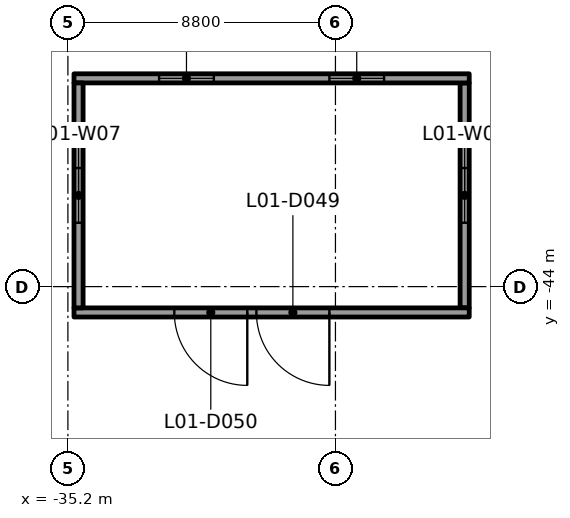
"""IFC4 building model, lengths in metres.
Left out: names, types, materials, properties, quantities, classifications, styles, units other than length and angle.
Written with IfcOpenShell. Run it as: python <this file> out.ifc"""

import sys

from ifc_helpers import new_model, si_unit, direction, frame, frame_2d, origin, place, context, subcontext, project, spatial, rectangle, extrude, element, fill, save


model = new_model("IFC4")
c1 = context("Model", 3, precision=1e-05, world=origin(), true_north=direction((0.0, 1.0)))
c2 = subcontext(c1, "Body", "Model", "MODEL_VIEW")
j1 = project(units=[si_unit("LENGTHUNIT", "METRE"), si_unit("PLANEANGLEUNIT", "RADIAN")], contexts=[c1])
p1 = place(None, origin())
s1 = spatial("IfcSite", under=j1, at=p1, CompositionType="ELEMENT")
p2 = place(p1, origin())
s2 = spatial("IfcBuilding", under=s1, at=p2, CompositionType="ELEMENT")
p3 = place(p2, frame((0.0, 0.0, 9.0)))
s3 = spatial("IfcBuildingStorey", under=s2, at=p3, CompositionType="ELEMENT", Elevation=9.0)
p4 = place(p3, frame((-22.0, -44.85, -0.06), z_axis=(0.0, 0.0, 1.0), x_axis=(-1.0, 0.0, 0.0)))
e1 = element("IfcWall", 1, at=p4, inside=s3, PredefinedType="STANDARD", context=c2, shape_type="SweptSolid", body=[
    extrude(rectangle(XDim=13.0, YDim=0.3, at=frame_2d((6.5, 0.0))), origin(), (0.0, 0.0, 1.0), 4.56),
])
p5 = place(p4, frame((4.6, 0.0, 0.06)))
e2 = element("IfcOpeningElement", 2, at=p5, cuts=e1, PredefinedType="OPENING", context=c2, shape_type="SweptSolid", body=[
    extrude(rectangle(XDim=2.4, YDim=3.0, at=frame_2d((1.2, 1.5))), frame((0.0, 0.15, 0.0), z_axis=(0.0, -1.0, 0.0), x_axis=(1.0, 0.0, 0.0)), (0.0, 0.0, 1.0), 0.3),
])
p6 = place(p4, frame((7.3, 0.0, 0.06)))
e3 = element("IfcOpeningElement", 3, at=p6, cuts=e1, PredefinedType="OPENING", context=c2, shape_type="SweptSolid", body=[
    extrude(rectangle(XDim=2.4, YDim=3.0, at=frame_2d((1.2, 1.5))), frame((0.0, 0.15, 0.0), z_axis=(0.0, -1.0, 0.0), x_axis=(1.0, 0.0, 0.0)), (0.0, 0.0, 1.0), 0.3),
])
p7 = place(p3, frame((-35.0, -37.15, -0.06), z_axis=(0.0, 0.0, 1.0), x_axis=(1.0, 0.0, 0.0)))
e4 = element("IfcWall", 4, at=p7, inside=s3, PredefinedType="STANDARD", context=c2, shape_type="SweptSolid", body=[
    extrude(rectangle(XDim=13.0, YDim=0.3, at=frame_2d((6.5, 0.0))), origin(), (0.0, 0.0, 1.0), 4.56),
])
p8 = place(p7, frame((2.8, 0.0, 0.46)))
e5 = element("IfcOpeningElement", 5, at=p8, cuts=e4, PredefinedType="OPENING", context=c2, shape_type="SweptSolid", body=[
    extrude(rectangle(XDim=1.8, YDim=2.4, at=frame_2d((0.9, 1.2))), frame((0.0, 0.15, 0.0), z_axis=(0.0, -1.0, 0.0), x_axis=(1.0, 0.0, 0.0)), (0.0, 0.0, 1.0), 0.3),
])
p9 = place(p7, frame((8.4, 0.0, 0.46)))
e6 = element("IfcOpeningElement", 6, at=p9, cuts=e4, PredefinedType="OPENING", context=c2, shape_type="SweptSolid", body=[
    extrude(rectangle(XDim=1.8, YDim=2.4, at=frame_2d((0.9, 1.2))), frame((0.0, 0.15, 0.0), z_axis=(0.0, -1.0, 0.0), x_axis=(1.0, 0.0, 0.0)), (0.0, 0.0, 1.0), 0.3),
])
p10 = place(p3, frame((-34.85, -37.3, -0.06), z_axis=(0.0, 0.0, 1.0), x_axis=(0.0, -1.0, 0.0)))
e7 = element("IfcWall", 7, at=p10, inside=s3, PredefinedType="STANDARD", context=c2, shape_type="SweptSolid", body=[
    extrude(rectangle(XDim=7.4, YDim=0.3, at=frame_2d((3.7, 0.0))), origin(), (0.0, 0.0, 1.0), 4.56),
])
p11 = place(p10, frame((2.8, 0.0, 0.46)))
e8 = element("IfcOpeningElement", 8, at=p11, cuts=e7, PredefinedType="OPENING", context=c2, shape_type="SweptSolid", body=[
    extrude(rectangle(XDim=1.8, YDim=2.4, at=frame_2d((0.9, 1.2))), frame((0.0, 0.15, 0.0), z_axis=(0.0, -1.0, 0.0), x_axis=(1.0, 0.0, 0.0)), (0.0, 0.0, 1.0), 0.3),
])
p12 = place(p3, frame((-22.15, -44.7, -0.06), z_axis=(0.0, 0.0, 1.0), x_axis=(0.0, 1.0, 0.0)))
e9 = element("IfcWall", 9, at=p12, inside=s3, PredefinedType="STANDARD", context=c2, shape_type="SweptSolid", body=[
    extrude(rectangle(XDim=7.4, YDim=0.3, at=frame_2d((3.7, 0.0))), origin(), (0.0, 0.0, 1.0), 4.56),
])
p13 = place(p12, frame((2.8, 0.0, 0.46)))
e10 = element("IfcOpeningElement", 10, at=p13, cuts=e9, PredefinedType="OPENING", context=c2, shape_type="SweptSolid", body=[
    extrude(rectangle(XDim=1.8, YDim=2.4, at=frame_2d((0.9, 1.2))), frame((0.0, 0.15, 0.0), z_axis=(0.0, -1.0, 0.0), x_axis=(1.0, 0.0, 0.0)), (0.0, 0.0, 1.0), 0.3),
])
p14 = place(p5, origin())
e11 = element("IfcDoor", 11, at=p14, inside=s3, OperationType="DOUBLE_DOOR_SINGLE_SWING", PredefinedType="DOOR", context=c2, shape_type="SweptSolid", body=[
    extrude(rectangle(XDim=2.4, YDim=3.0, at=frame_2d((1.2, 1.5))), frame((0.0, 0.025, 0.0), z_axis=(0.0, -1.0, 0.0), x_axis=(1.0, 0.0, 0.0)), (0.0, 0.0, 1.0), 0.05),
])
fill(e2, e11)
p15 = place(p6, origin())
e12 = element("IfcDoor", 12, at=p15, inside=s3, OperationType="DOUBLE_DOOR_SINGLE_SWING", PredefinedType="DOOR", context=c2, shape_type="SweptSolid", body=[
    extrude(rectangle(XDim=2.4, YDim=3.0, at=frame_2d((1.2, 1.5))), frame((0.0, 0.025, 0.0), z_axis=(0.0, -1.0, 0.0), x_axis=(1.0, 0.0, 0.0)), (0.0, 0.0, 1.0), 0.05),
])
fill(e3, e12)
p16 = place(p8, origin())
e13 = element("IfcWindow", 13, at=p16, inside=s3, PartitioningType="SINGLE_PANEL", PredefinedType="WINDOW", context=c2, shape_type="SweptSolid", body=[
    extrude(rectangle(XDim=1.8, YDim=2.4, at=frame_2d((0.9, 1.2))), frame((0.0, 0.03, 0.0), z_axis=(0.0, -1.0, 0.0), x_axis=(1.0, 0.0, 0.0)), (0.0, 0.0, 1.0), 0.06),
])
fill(e5, e13)
p17 = place(p9, origin())
e14 = element("IfcWindow", 14, at=p17, inside=s3, PartitioningType="SINGLE_PANEL", PredefinedType="WINDOW", context=c2, shape_type="SweptSolid", body=[
    extrude(rectangle(XDim=1.8, YDim=2.4, at=frame_2d((0.9, 1.2))), frame((0.0, 0.03, 0.0), z_axis=(0.0, -1.0, 0.0), x_axis=(1.0, 0.0, 0.0)), (0.0, 0.0, 1.0), 0.06),
])
fill(e6, e14)
p18 = place(p11, origin())
e15 = element("IfcWindow", 15, at=p18, inside=s3, PartitioningType="SINGLE_PANEL", PredefinedType="WINDOW", context=c2, shape_type="SweptSolid", body=[
    extrude(rectangle(XDim=1.8, YDim=2.4, at=frame_2d((0.9, 1.2))), frame((0.0, 0.03, 0.0), z_axis=(0.0, -1.0, 0.0), x_axis=(1.0, 0.0, 0.0)), (0.0, 0.0, 1.0), 0.06),
])
fill(e8, e15)
p19 = place(p13, origin())
e16 = element("IfcWindow", 16, at=p19, inside=s3, PartitioningType="SINGLE_PANEL", PredefinedType="WINDOW", context=c2, shape_type="SweptSolid", body=[
    extrude(rectangle(XDim=1.8, YDim=2.4, at=frame_2d((0.9, 1.2))), frame((0.0, 0.03, 0.0), z_axis=(0.0, -1.0, 0.0), x_axis=(1.0, 0.0, 0.0)), (0.0, 0.0, 1.0), 0.06),
])
fill(e10, e16)
save(model, sys.argv[1])
